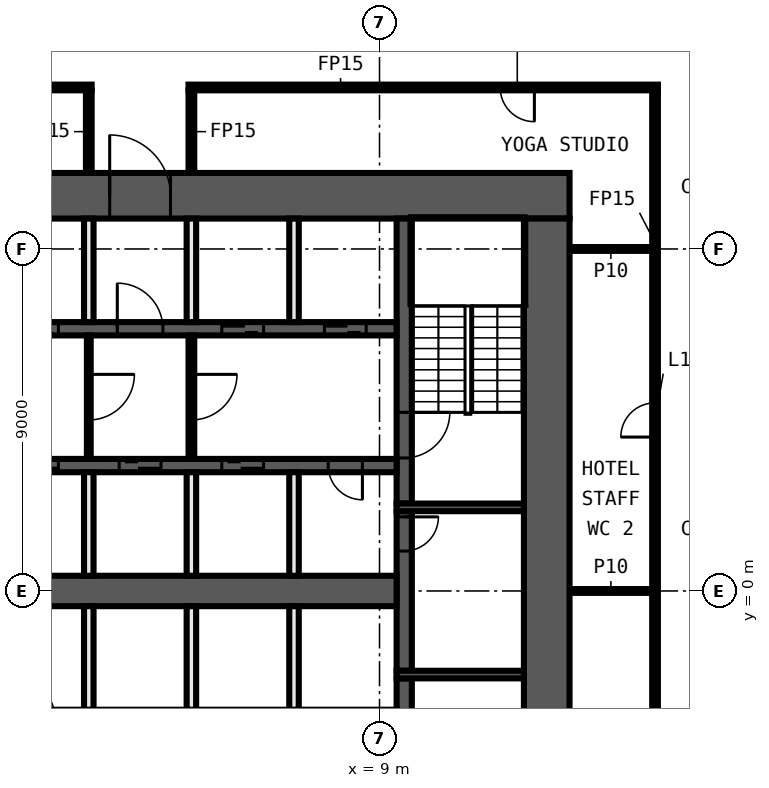
"""IFC4 building model, lengths in metres.
Left out: names, types, materials, properties, quantities, classifications, styles, units other than length and angle.
Written with IfcOpenShell. Run it as: python <this file> out.ifc"""

import sys

from ifc_helpers import new_model, si_unit, direction, frame, frame_2d, origin, place, context, subcontext, project, spatial, rectangle, extrude, element, fill, save


model = new_model("IFC4")
c1 = context("Model", 3, precision=1e-05, world=origin(), true_north=direction((0.0, 1.0)))
c2 = subcontext(c1, "Body", "Model", "MODEL_VIEW")
j1 = project(units=[si_unit("LENGTHUNIT", "METRE"), si_unit("PLANEANGLEUNIT", "RADIAN")], contexts=[c1])
p1 = place(None, origin())
s1 = spatial("IfcSite", under=j1, at=p1, CompositionType="ELEMENT")
p2 = place(p1, origin())
s2 = spatial("IfcBuilding", under=s1, at=p2, CompositionType="ELEMENT")
p3 = place(p2, frame((0.0, 0.0, 66.2)))
s3 = spatial("IfcBuildingStorey", under=s2, at=p3, CompositionType="ELEMENT", Elevation=66.2)
for number, where, z_axis, x_axis in (
    (1, (14.0, 0.0, 0.0), (0.0, 0.0, 1.0), (1.0, 0.0, 0.0)),
    (2, (14.0, 9.0, 0.0), (0.0, 0.0, 1.0), (1.0, 0.0, 0.0)),
):
    element("IfcWall", number, at=place(p3, frame(where, z_axis=z_axis, x_axis=x_axis)), inside=s3, PredefinedType="PARTITIONING", context=c2, shape_type="SweptSolid", body=[
        extrude(rectangle(XDim=2.175, YDim=0.1, at=frame_2d((1.087, 0.0))), origin(), (0.0, 0.0, 1.0), 3.3),
    ])
p4 = place(p3, frame((1.425, 13.25, 0.0), z_axis=(0.0, 0.0, 1.0), x_axis=(-1.0, 0.0, 0.0)))
e3 = element("IfcWall", 3, at=p4, inside=s3, PredefinedType="PARTITIONING", context=c2, shape_type="SweptSolid", body=[
    extrude(rectangle(XDim=17.75, YDim=0.15, at=frame_2d((8.875, 0.0))), origin(), (0.0, 0.0, 1.0), 3.3),
])
p5 = place(p4, frame((5.475, 0.0, 0.0)))
e4 = element("IfcOpeningElement", 4, at=p5, cuts=e3, PredefinedType="OPENING", context=c2, shape_type="SweptSolid", body=[
    extrude(rectangle(XDim=0.9, YDim=2.1, at=frame_2d((0.45, 1.05))), frame((0.0, 0.085, 0.0), z_axis=(0.0, -1.0, 0.0), x_axis=(1.0, 0.0, 0.0)), (0.0, 0.0, 1.0), 0.17),
])
p6 = place(p4, frame((13.6, 0.0, 0.0)))
e5 = element("IfcOpeningElement", 5, at=p6, cuts=e3, PredefinedType="OPENING", context=c2, shape_type="SweptSolid", body=[
    extrude(rectangle(XDim=0.9, YDim=2.1, at=frame_2d((0.45, 1.05))), frame((0.0, 0.085, 0.0), z_axis=(0.0, -1.0, 0.0), x_axis=(1.0, 0.0, 0.0)), (0.0, 0.0, 1.0), 0.17),
])
p7 = place(p3, frame((16.325, 13.25, 0.0), z_axis=(0.0, 0.0, 1.0), x_axis=(-1.0, 0.0, 0.0)))
e6 = element("IfcWall", 6, at=p7, inside=s3, PredefinedType="PARTITIONING", context=c2, shape_type="SweptSolid", body=[
    extrude(rectangle(XDim=12.35, YDim=0.15, at=frame_2d((6.175, 0.0))), origin(), (0.0, 0.0, 1.0), 3.3),
])
p8 = place(p7, frame((3.25, 0.0, 0.0)))
e7 = element("IfcOpeningElement", 7, at=p8, cuts=e6, PredefinedType="OPENING", context=c2, shape_type="SweptSolid", body=[
    extrude(rectangle(XDim=0.9, YDim=2.1, at=frame_2d((0.45, 1.05))), frame((0.0, 0.085, 0.0), z_axis=(0.0, -1.0, 0.0), x_axis=(1.0, 0.0, 0.0)), (0.0, 0.0, 1.0), 0.17),
])
p9 = place(p3, frame((16.25, -13.175, 0.0), z_axis=(0.0, 0.0, 1.0), x_axis=(0.0, 1.0, 0.0)))
e8 = element("IfcWall", 8, at=p9, inside=s3, PredefinedType="PARTITIONING", context=c2, shape_type="SweptSolid", body=[
    extrude(rectangle(XDim=26.35, YDim=0.15, at=frame_2d((13.175, 0.0))), origin(), (0.0, 0.0, 1.0), 3.3),
])
p10 = place(p9, frame((8.225, 0.0, 0.0)))
e9 = element("IfcOpeningElement", 9, at=p10, cuts=e8, PredefinedType="OPENING", context=c2, shape_type="SweptSolid", body=[
    extrude(rectangle(XDim=0.9, YDim=2.1, at=frame_2d((0.45, 1.05))), frame((0.0, 0.085, 0.0), z_axis=(0.0, -1.0, 0.0), x_axis=(1.0, 0.0, 0.0)), (0.0, 0.0, 1.0), 0.17),
])
p11 = place(p9, frame((17.225, 0.0, 0.0)))
e10 = element("IfcOpeningElement", 10, at=p11, cuts=e8, PredefinedType="OPENING", context=c2, shape_type="SweptSolid", body=[
    extrude(rectangle(XDim=0.9, YDim=2.1, at=frame_2d((0.45, 1.05))), frame((0.0, 0.085, 0.0), z_axis=(0.0, -1.0, 0.0), x_axis=(1.0, 0.0, 0.0)), (0.0, 0.0, 1.0), 0.17),
])
for number, where, z_axis, x_axis in (
    (11, (4.05, 11.0, 0.0), (0.0, 0.0, 1.0), (0.0, 1.0, 0.0)),
    (12, (1.35, 11.0, 0.0), (0.0, 0.0, 1.0), (0.0, 1.0, 0.0)),
):
    element("IfcWall", number, at=place(p3, frame(where, z_axis=z_axis, x_axis=x_axis)), inside=s3, PredefinedType="PARTITIONING", context=c2, shape_type="SweptSolid", body=[
        extrude(rectangle(XDim=2.175, YDim=0.15, at=frame_2d((1.087, 0.0))), origin(), (0.0, 0.0, 1.0), 3.3),
    ])
p12 = place(p3, frame((-14.0, 10.4, 0.0), z_axis=(0.0, 0.0, 1.0), x_axis=(1.0, 0.0, 0.0)))
e13 = element("IfcWall", 13, at=p12, inside=s3, PredefinedType="SHEAR", context=c2, shape_type="SweptSolid", body=[
    extrude(rectangle(XDim=28.0, YDim=1.2, at=frame_2d((14.0, 0.0))), origin(), (0.0, 0.0, 1.0), 3.3),
])
p13 = place(p12, frame((15.9, 0.0, 0.0)))
e14 = element("IfcOpeningElement", 14, at=p13, cuts=e13, PredefinedType="OPENING", context=c2, shape_type="SweptSolid", body=[
    extrude(rectangle(XDim=1.6, YDim=2.1, at=frame_2d((0.8, 1.05))), frame((0.0, 0.61, 0.0), z_axis=(0.0, -1.0, 0.0), x_axis=(1.0, 0.0, 0.0)), (0.0, 0.0, 1.0), 1.22),
])
p14 = place(p3, frame((13.4, 9.8, 0.0), z_axis=(0.0, 0.0, 1.0), x_axis=(0.0, -1.0, 0.0)))
e15 = element("IfcWall", 15, at=p14, inside=s3, PredefinedType="SHEAR", context=c2, shape_type="SweptSolid", body=[
    extrude(rectangle(XDim=19.6, YDim=1.2, at=frame_2d((9.8, 0.0))), origin(), (0.0, 0.0, 1.0), 3.3),
])
p15 = place(p3, frame((9.65, -2.3, 0.0), z_axis=(0.0, 0.0, 1.0), x_axis=(0.0, -1.0, 0.0)))
e16 = element("IfcWall", 16, at=p15, inside=s3, PredefinedType="SHEAR", context=c2, shape_type="SweptSolid", body=[
    extrude(rectangle(XDim=7.5, YDim=0.4, at=frame_2d((3.75, 0.0))), origin(), (0.0, 0.0, 1.0), 3.3),
])
p16 = place(p15, frame((1.2, 0.0, 0.0)))
e17 = element("IfcOpeningElement", 17, at=p16, cuts=e16, PredefinedType="OPENING", context=c2, shape_type="SweptSolid", body=[
    extrude(rectangle(XDim=1.2, YDim=2.1, at=frame_2d((0.6, 1.05))), frame((0.0, 0.21, 0.0), z_axis=(0.0, -1.0, 0.0), x_axis=(1.0, 0.0, 0.0)), (0.0, 0.0, 1.0), 0.42),
])
p17 = place(p3, frame((9.65, 2.1, 0.0), z_axis=(0.0, 0.0, 1.0), x_axis=(0.0, -1.0, 0.0)))
e18 = element("IfcWall", 18, at=p17, inside=s3, PredefinedType="SHEAR", context=c2, shape_type="SweptSolid", body=[
    extrude(rectangle(XDim=4.2, YDim=0.4, at=frame_2d((2.1, 0.0))), origin(), (0.0, 0.0, 1.0), 3.3),
])
p18 = place(p17, frame((0.15, 0.0, 0.0)))
e19 = element("IfcOpeningElement", 19, at=p18, cuts=e18, PredefinedType="OPENING", context=c2, shape_type="SweptSolid", body=[
    extrude(rectangle(XDim=0.9, YDim=2.1, at=frame_2d((0.45, 1.05))), frame((0.0, 0.21, 0.0), z_axis=(0.0, -1.0, 0.0), x_axis=(1.0, 0.0, 0.0)), (0.0, 0.0, 1.0), 0.42),
])
p19 = place(p3, frame((9.65, 9.8, 0.0), z_axis=(0.0, 0.0, 1.0), x_axis=(0.0, -1.0, 0.0)))
e20 = element("IfcWall", 20, at=p19, inside=s3, PredefinedType="SHEAR", context=c2, shape_type="SweptSolid", body=[
    extrude(rectangle(XDim=7.5, YDim=0.4, at=frame_2d((3.75, 0.0))), origin(), (0.0, 0.0, 1.0), 3.3),
])
p20 = place(p19, frame((5.1, 0.0, 0.0)))
e21 = element("IfcOpeningElement", 21, at=p20, cuts=e20, PredefinedType="OPENING", context=c2, shape_type="SweptSolid", body=[
    extrude(rectangle(XDim=1.2, YDim=2.1, at=frame_2d((0.6, 1.05))), frame((0.0, 0.21, 0.0), z_axis=(0.0, -1.0, 0.0), x_axis=(1.0, 0.0, 0.0)), (0.0, 0.0, 1.0), 0.42),
])
for number, where, z_axis, x_axis in (
    (22, (9.45, 2.2, 0.0), (0.0, 0.0, 1.0), (1.0, 0.0, 0.0)),
    (23, (9.45, -2.2, 0.0), (0.0, 0.0, 1.0), (1.0, 0.0, 0.0)),
):
    element("IfcWall", number, at=place(p3, frame(where, z_axis=z_axis, x_axis=x_axis)), inside=s3, PredefinedType="SHEAR", context=c2, shape_type="SweptSolid", body=[
        extrude(rectangle(XDim=3.35, YDim=0.2, at=frame_2d((1.675, 0.0))), origin(), (0.0, 0.0, 1.0), 3.3),
    ])
p21 = place(p3, frame((-9.45, 6.9, 0.0), z_axis=(0.0, 0.0, 1.0), x_axis=(1.0, 0.0, 0.0)))
e24 = element("IfcWall", 24, at=p21, inside=s3, PredefinedType="SHEAR", context=c2, shape_type="SweptSolid", body=[
    extrude(rectangle(XDim=18.9, YDim=0.35, at=frame_2d((9.45, 0.0))), origin(), (0.0, 0.0, 1.0), 3.3),
])
p22 = place(p21, frame((0.8, 0.0, 0.0)))
e25 = element("IfcOpeningElement", 25, at=p22, cuts=e24, PredefinedType="OPENING", context=c2, shape_type="SweptSolid", body=[
    extrude(rectangle(XDim=1.1, YDim=2.1, at=frame_2d((0.55, 1.05))), frame((0.0, 0.185, 0.0), z_axis=(0.0, -1.0, 0.0), x_axis=(1.0, 0.0, 0.0)), (0.0, 0.0, 1.0), 0.37),
])
p23 = place(p21, frame((3.5, 0.0, 0.0)))
e26 = element("IfcOpeningElement", 26, at=p23, cuts=e24, PredefinedType="OPENING", context=c2, shape_type="SweptSolid", body=[
    extrude(rectangle(XDim=1.1, YDim=2.1, at=frame_2d((0.55, 1.05))), frame((0.0, 0.185, 0.0), z_axis=(0.0, -1.0, 0.0), x_axis=(1.0, 0.0, 0.0)), (0.0, 0.0, 1.0), 0.37),
])
p24 = place(p21, frame((6.2, 0.0, 0.0)))
e27 = element("IfcOpeningElement", 27, at=p24, cuts=e24, PredefinedType="OPENING", context=c2, shape_type="SweptSolid", body=[
    extrude(rectangle(XDim=1.1, YDim=2.1, at=frame_2d((0.55, 1.05))), frame((0.0, 0.185, 0.0), z_axis=(0.0, -1.0, 0.0), x_axis=(1.0, 0.0, 0.0)), (0.0, 0.0, 1.0), 0.37),
])
p25 = place(p21, frame((8.9, 0.0, 0.0)))
e28 = element("IfcOpeningElement", 28, at=p25, cuts=e24, PredefinedType="OPENING", context=c2, shape_type="SweptSolid", body=[
    extrude(rectangle(XDim=1.1, YDim=2.1, at=frame_2d((0.55, 1.05))), frame((0.0, 0.185, 0.0), z_axis=(0.0, -1.0, 0.0), x_axis=(1.0, 0.0, 0.0)), (0.0, 0.0, 1.0), 0.37),
])
p26 = place(p21, frame((11.55, 0.0, 0.0)))
e29 = element("IfcOpeningElement", 29, at=p26, cuts=e24, PredefinedType="OPENING", context=c2, shape_type="SweptSolid", body=[
    extrude(rectangle(XDim=1.2, YDim=2.1, at=frame_2d((0.6, 1.05))), frame((0.0, 0.185, 0.0), z_axis=(0.0, -1.0, 0.0), x_axis=(1.0, 0.0, 0.0)), (0.0, 0.0, 1.0), 0.37),
])
p27 = place(p21, frame((14.3, 0.0, 0.0)))
e30 = element("IfcOpeningElement", 30, at=p27, cuts=e24, PredefinedType="OPENING", context=c2, shape_type="SweptSolid", body=[
    extrude(rectangle(XDim=1.1, YDim=2.1, at=frame_2d((0.55, 1.05))), frame((0.0, 0.185, 0.0), z_axis=(0.0, -1.0, 0.0), x_axis=(1.0, 0.0, 0.0)), (0.0, 0.0, 1.0), 0.37),
])
p28 = place(p21, frame((17.0, 0.0, 0.0)))
e31 = element("IfcOpeningElement", 31, at=p28, cuts=e24, PredefinedType="OPENING", context=c2, shape_type="SweptSolid", body=[
    extrude(rectangle(XDim=1.1, YDim=2.1, at=frame_2d((0.55, 1.05))), frame((0.0, 0.185, 0.0), z_axis=(0.0, -1.0, 0.0), x_axis=(1.0, 0.0, 0.0)), (0.0, 0.0, 1.0), 0.37),
])
p29 = place(p3, frame((9.45, 3.3, 0.0), z_axis=(0.0, 0.0, 1.0), x_axis=(-1.0, 0.0, 0.0)))
e32 = element("IfcWall", 32, at=p29, inside=s3, PredefinedType="SHEAR", context=c2, shape_type="SweptSolid", body=[
    extrude(rectangle(XDim=18.9, YDim=0.35, at=frame_2d((9.45, 0.0))), origin(), (0.0, 0.0, 1.0), 3.3),
])
p30 = place(p29, frame((17.0, 0.0, 0.0)))
e33 = element("IfcOpeningElement", 33, at=p30, cuts=e32, PredefinedType="OPENING", context=c2, shape_type="SweptSolid", body=[
    extrude(rectangle(XDim=1.1, YDim=2.1, at=frame_2d((0.55, 1.05))), frame((0.0, 0.185, 0.0), z_axis=(0.0, -1.0, 0.0), x_axis=(1.0, 0.0, 0.0)), (0.0, 0.0, 1.0), 0.37),
])
p31 = place(p29, frame((14.3, 0.0, 0.0)))
e34 = element("IfcOpeningElement", 34, at=p31, cuts=e32, PredefinedType="OPENING", context=c2, shape_type="SweptSolid", body=[
    extrude(rectangle(XDim=1.1, YDim=2.1, at=frame_2d((0.55, 1.05))), frame((0.0, 0.185, 0.0), z_axis=(0.0, -1.0, 0.0), x_axis=(1.0, 0.0, 0.0)), (0.0, 0.0, 1.0), 0.37),
])
p32 = place(p29, frame((11.6, 0.0, 0.0)))
e35 = element("IfcOpeningElement", 35, at=p32, cuts=e32, PredefinedType="OPENING", context=c2, shape_type="SweptSolid", body=[
    extrude(rectangle(XDim=1.1, YDim=2.1, at=frame_2d((0.55, 1.05))), frame((0.0, 0.185, 0.0), z_axis=(0.0, -1.0, 0.0), x_axis=(1.0, 0.0, 0.0)), (0.0, 0.0, 1.0), 0.37),
])
p33 = place(p29, frame((8.9, 0.0, 0.0)))
e36 = element("IfcOpeningElement", 36, at=p33, cuts=e32, PredefinedType="OPENING", context=c2, shape_type="SweptSolid", body=[
    extrude(rectangle(XDim=1.1, YDim=2.1, at=frame_2d((0.55, 1.05))), frame((0.0, 0.185, 0.0), z_axis=(0.0, -1.0, 0.0), x_axis=(1.0, 0.0, 0.0)), (0.0, 0.0, 1.0), 0.37),
])
p34 = place(p29, frame((6.2, 0.0, 0.0)))
e37 = element("IfcOpeningElement", 37, at=p34, cuts=e32, PredefinedType="OPENING", context=c2, shape_type="SweptSolid", body=[
    extrude(rectangle(XDim=1.1, YDim=2.1, at=frame_2d((0.55, 1.05))), frame((0.0, 0.185, 0.0), z_axis=(0.0, -1.0, 0.0), x_axis=(1.0, 0.0, 0.0)), (0.0, 0.0, 1.0), 0.37),
])
p35 = place(p29, frame((3.5, 0.0, 0.0)))
e38 = element("IfcOpeningElement", 38, at=p35, cuts=e32, PredefinedType="OPENING", context=c2, shape_type="SweptSolid", body=[
    extrude(rectangle(XDim=1.1, YDim=2.1, at=frame_2d((0.55, 1.05))), frame((0.0, 0.185, 0.0), z_axis=(0.0, -1.0, 0.0), x_axis=(1.0, 0.0, 0.0)), (0.0, 0.0, 1.0), 0.37),
])
p36 = place(p29, frame((0.9, 0.0, 0.0)))
e39 = element("IfcOpeningElement", 39, at=p36, cuts=e32, PredefinedType="OPENING", context=c2, shape_type="SweptSolid", body=[
    extrude(rectangle(XDim=0.9, YDim=2.1, at=frame_2d((0.45, 1.05))), frame((0.0, 0.185, 0.0), z_axis=(0.0, -1.0, 0.0), x_axis=(1.0, 0.0, 0.0)), (0.0, 0.0, 1.0), 0.37),
])
p37 = place(p3, frame((-9.45, 0.0, 0.0), z_axis=(0.0, 0.0, 1.0), x_axis=(1.0, 0.0, 0.0)))
e40 = element("IfcWall", 40, at=p37, inside=s3, PredefinedType="SHEAR", context=c2, shape_type="SweptSolid", body=[
    extrude(rectangle(XDim=18.9, YDim=0.8, at=frame_2d((9.45, 0.0))), origin(), (0.0, 0.0, 1.0), 3.3),
])
for number, where, z_axis, x_axis in (
    (41, (6.75, -3.125, 0.0), (0.0, 0.0, 1.0), (0.0, 1.0, 0.0)),
    (42, (6.75, 0.4, 0.0), (0.0, 0.0, 1.0), (0.0, 1.0, 0.0)),
    (43, (6.75, 7.075, 0.0), (0.0, 0.0, 1.0), (0.0, 1.0, 0.0)),
):
    element("IfcWall", number, at=place(p3, frame(where, z_axis=z_axis, x_axis=x_axis)), inside=s3, PredefinedType="SOLIDWALL", context=c2, shape_type="SweptSolid", body=[
        extrude(rectangle(XDim=2.725, YDim=0.25, at=frame_2d((1.363, 0.0))), origin(), (0.0, 0.0, 1.0), 3.3),
    ])
p38 = place(p3, frame((4.05, 6.725, 0.0), z_axis=(0.0, 0.0, 1.0), x_axis=(0.0, -1.0, 0.0)))
e44 = element("IfcWall", 44, at=p38, inside=s3, PredefinedType="PARTITIONING", context=c2, shape_type="SweptSolid", body=[
    extrude(rectangle(XDim=3.25, YDim=0.15, at=frame_2d((1.625, 0.0))), origin(), (0.0, 0.0, 1.0), 3.3),
])
p39 = place(p38, frame((1.025, 0.0, 0.0)))
e45 = element("IfcOpeningElement", 45, at=p39, cuts=e44, PredefinedType="OPENING", context=c2, shape_type="SweptSolid", body=[
    extrude(rectangle(XDim=1.2, YDim=2.1, at=frame_2d((0.6, 1.05))), frame((0.0, 0.085, 0.0), z_axis=(0.0, -1.0, 0.0), x_axis=(1.0, 0.0, 0.0)), (0.0, 0.0, 1.0), 0.17),
])
for number, where, z_axis, x_axis in (
    (46, (4.05, -3.125, 0.0), (0.0, 0.0, 1.0), (0.0, 1.0, 0.0)),
    (47, (4.05, 0.4, 0.0), (0.0, 0.0, 1.0), (0.0, 1.0, 0.0)),
    (48, (4.05, 7.075, 0.0), (0.0, 0.0, 1.0), (0.0, 1.0, 0.0)),
):
    element("IfcWall", number, at=place(p3, frame(where, z_axis=z_axis, x_axis=x_axis)), inside=s3, PredefinedType="SOLIDWALL", context=c2, shape_type="SweptSolid", body=[
        extrude(rectangle(XDim=2.725, YDim=0.25, at=frame_2d((1.363, 0.0))), origin(), (0.0, 0.0, 1.0), 3.3),
    ])
p40 = place(p3, frame((1.35, 6.725, 0.0), z_axis=(0.0, 0.0, 1.0), x_axis=(0.0, -1.0, 0.0)))
e49 = element("IfcWall", 49, at=p40, inside=s3, PredefinedType="PARTITIONING", context=c2, shape_type="SweptSolid", body=[
    extrude(rectangle(XDim=3.25, YDim=0.1, at=frame_2d((1.625, 0.0))), origin(), (0.0, 0.0, 1.0), 3.3),
])
p41 = place(p40, frame((1.025, 0.0, 0.0)))
e50 = element("IfcOpeningElement", 50, at=p41, cuts=e49, PredefinedType="OPENING", context=c2, shape_type="SweptSolid", body=[
    extrude(rectangle(XDim=1.2, YDim=2.1, at=frame_2d((0.6, 1.05))), frame((0.0, 0.06, 0.0), z_axis=(0.0, -1.0, 0.0), x_axis=(1.0, 0.0, 0.0)), (0.0, 0.0, 1.0), 0.12),
])
for number, where, z_axis, x_axis in (
    (51, (1.35, -3.125, 0.0), (0.0, 0.0, 1.0), (0.0, 1.0, 0.0)),
    (52, (1.35, 0.4, 0.0), (0.0, 0.0, 1.0), (0.0, 1.0, 0.0)),
    (53, (1.35, 7.075, 0.0), (0.0, 0.0, 1.0), (0.0, 1.0, 0.0)),
):
    element("IfcWall", number, at=place(p3, frame(where, z_axis=z_axis, x_axis=x_axis)), inside=s3, PredefinedType="SOLIDWALL", context=c2, shape_type="SweptSolid", body=[
        extrude(rectangle(XDim=2.725, YDim=0.25, at=frame_2d((1.363, 0.0))), origin(), (0.0, 0.0, 1.0), 3.3),
    ])
p42 = place(p11, origin())
e54 = element("IfcDoor", 54, at=p42, inside=s3, OperationType="SINGLE_SWING_RIGHT", PredefinedType="DOOR", context=c2, shape_type="SweptSolid", body=[
    extrude(rectangle(XDim=0.9, YDim=2.1, at=frame_2d((0.45, 1.05))), frame((0.0, 0.025, 0.0), z_axis=(0.0, -1.0, 0.0), x_axis=(1.0, 0.0, 0.0)), (0.0, 0.0, 1.0), 0.05),
])
fill(e10, e54)
p43 = place(p8, origin())
e55 = element("IfcDoor", 55, at=p43, inside=s3, OperationType="SINGLE_SWING_LEFT", PredefinedType="DOOR", context=c2, shape_type="SweptSolid", body=[
    extrude(rectangle(XDim=0.9, YDim=2.1, at=frame_2d((0.45, 1.05))), frame((0.0, 0.025, 0.0), z_axis=(0.0, -1.0, 0.0), x_axis=(1.0, 0.0, 0.0)), (0.0, 0.0, 1.0), 0.05),
])
fill(e7, e55)
p44 = place(p18, origin())
e56 = element("IfcDoor", 56, at=p44, inside=s3, OperationType="SINGLE_SWING_RIGHT", PredefinedType="DOOR", context=c2, shape_type="SweptSolid", body=[
    extrude(rectangle(XDim=0.9, YDim=2.1, at=frame_2d((0.45, 1.05))), frame((0.0, 0.025, 0.0), z_axis=(0.0, -1.0, 0.0), x_axis=(1.0, 0.0, 0.0)), (0.0, 0.0, 1.0), 0.05),
])
fill(e19, e56)
p45 = place(p25, origin())
e57 = element("IfcDoor", 57, at=p45, inside=s3, OperationType="DOUBLE_DOOR_SLIDING", PredefinedType="DOOR", context=c2, shape_type="SweptSolid", body=[
    extrude(rectangle(XDim=1.1, YDim=2.1, at=frame_2d((0.55, 1.05))), frame((0.0, 0.025, 0.0), z_axis=(0.0, -1.0, 0.0), x_axis=(1.0, 0.0, 0.0)), (0.0, 0.0, 1.0), 0.05),
])
fill(e28, e57)
p46 = place(p13, origin())
e58 = element("IfcDoor", 58, at=p46, inside=s3, OperationType="DOUBLE_DOOR_SINGLE_SWING", PredefinedType="DOOR", context=c2, shape_type="SweptSolid", body=[
    extrude(rectangle(XDim=1.6, YDim=2.1, at=frame_2d((0.8, 1.05))), frame((0.0, 0.025, 0.0), z_axis=(0.0, -1.0, 0.0), x_axis=(1.0, 0.0, 0.0)), (0.0, 0.0, 1.0), 0.05),
])
fill(e14, e58)
p47 = place(p26, origin())
e59 = element("IfcDoor", 59, at=p47, inside=s3, OperationType="SINGLE_SWING_LEFT", PredefinedType="DOOR", context=c2, shape_type="SweptSolid", body=[
    extrude(rectangle(XDim=1.2, YDim=2.1, at=frame_2d((0.6, 1.05))), frame((0.0, 0.025, 0.0), z_axis=(0.0, -1.0, 0.0), x_axis=(1.0, 0.0, 0.0)), (0.0, 0.0, 1.0), 0.05),
])
fill(e29, e59)
p48 = place(p27, origin())
e60 = element("IfcDoor", 60, at=p48, inside=s3, OperationType="DOUBLE_DOOR_SLIDING", PredefinedType="DOOR", context=c2, shape_type="SweptSolid", body=[
    extrude(rectangle(XDim=1.1, YDim=2.1, at=frame_2d((0.55, 1.05))), frame((0.0, 0.025, 0.0), z_axis=(0.0, -1.0, 0.0), x_axis=(1.0, 0.0, 0.0)), (0.0, 0.0, 1.0), 0.05),
])
fill(e30, e60)
p49 = place(p28, origin())
e61 = element("IfcDoor", 61, at=p49, inside=s3, OperationType="DOUBLE_DOOR_SLIDING", PredefinedType="DOOR", context=c2, shape_type="SweptSolid", body=[
    extrude(rectangle(XDim=1.1, YDim=2.1, at=frame_2d((0.55, 1.05))), frame((0.0, 0.025, 0.0), z_axis=(0.0, -1.0, 0.0), x_axis=(1.0, 0.0, 0.0)), (0.0, 0.0, 1.0), 0.05),
])
fill(e31, e61)
p50 = place(p33, origin())
e62 = element("IfcDoor", 62, at=p50, inside=s3, OperationType="DOUBLE_DOOR_SLIDING", PredefinedType="DOOR", context=c2, shape_type="SweptSolid", body=[
    extrude(rectangle(XDim=1.1, YDim=2.1, at=frame_2d((0.55, 1.05))), frame((0.0, 0.025, 0.0), z_axis=(0.0, -1.0, 0.0), x_axis=(1.0, 0.0, 0.0)), (0.0, 0.0, 1.0), 0.05),
])
fill(e36, e62)
p51 = place(p34, origin())
e63 = element("IfcDoor", 63, at=p51, inside=s3, OperationType="DOUBLE_DOOR_SLIDING", PredefinedType="DOOR", context=c2, shape_type="SweptSolid", body=[
    extrude(rectangle(XDim=1.1, YDim=2.1, at=frame_2d((0.55, 1.05))), frame((0.0, 0.025, 0.0), z_axis=(0.0, -1.0, 0.0), x_axis=(1.0, 0.0, 0.0)), (0.0, 0.0, 1.0), 0.05),
])
fill(e37, e63)
p52 = place(p35, origin())
e64 = element("IfcDoor", 64, at=p52, inside=s3, OperationType="DOUBLE_DOOR_SLIDING", PredefinedType="DOOR", context=c2, shape_type="SweptSolid", body=[
    extrude(rectangle(XDim=1.1, YDim=2.1, at=frame_2d((0.55, 1.05))), frame((0.0, 0.025, 0.0), z_axis=(0.0, -1.0, 0.0), x_axis=(1.0, 0.0, 0.0)), (0.0, 0.0, 1.0), 0.05),
])
fill(e38, e64)
p53 = place(p36, origin())
e65 = element("IfcDoor", 65, at=p53, inside=s3, OperationType="SINGLE_SWING_LEFT", PredefinedType="DOOR", context=c2, shape_type="SweptSolid", body=[
    extrude(rectangle(XDim=0.9, YDim=2.1, at=frame_2d((0.45, 1.05))), frame((0.0, 0.025, 0.0), z_axis=(0.0, -1.0, 0.0), x_axis=(1.0, 0.0, 0.0)), (0.0, 0.0, 1.0), 0.05),
])
fill(e39, e65)
p54 = place(p20, origin())
e66 = element("IfcDoor", 66, at=p54, inside=s3, OperationType="SINGLE_SWING_LEFT", PredefinedType="DOOR", context=c2, shape_type="SweptSolid", body=[
    extrude(rectangle(XDim=1.2, YDim=2.1, at=frame_2d((0.6, 1.05))), frame((0.0, 0.025, 0.0), z_axis=(0.0, -1.0, 0.0), x_axis=(1.0, 0.0, 0.0)), (0.0, 0.0, 1.0), 0.05),
])
fill(e21, e66)
p55 = place(p41, origin())
e67 = element("IfcDoor", 67, at=p55, inside=s3, OperationType="SINGLE_SWING_LEFT", PredefinedType="DOOR", context=c2, shape_type="SweptSolid", body=[
    extrude(rectangle(XDim=1.2, YDim=2.1, at=frame_2d((0.6, 1.05))), frame((0.0, 0.025, 0.0), z_axis=(0.0, -1.0, 0.0), x_axis=(1.0, 0.0, 0.0)), (0.0, 0.0, 1.0), 0.05),
])
fill(e50, e67)
p56 = place(p39, origin())
e68 = element("IfcDoor", 68, at=p56, inside=s3, OperationType="SINGLE_SWING_RIGHT", PredefinedType="DOOR", context=c2, shape_type="SweptSolid", body=[
    extrude(rectangle(XDim=1.2, YDim=2.1, at=frame_2d((0.6, 1.05))), frame((0.0, 0.025, 0.0), z_axis=(0.0, -1.0, 0.0), x_axis=(1.0, 0.0, 0.0)), (0.0, 0.0, 1.0), 0.05),
])
fill(e45, e68)
save(model, sys.argv[1])
